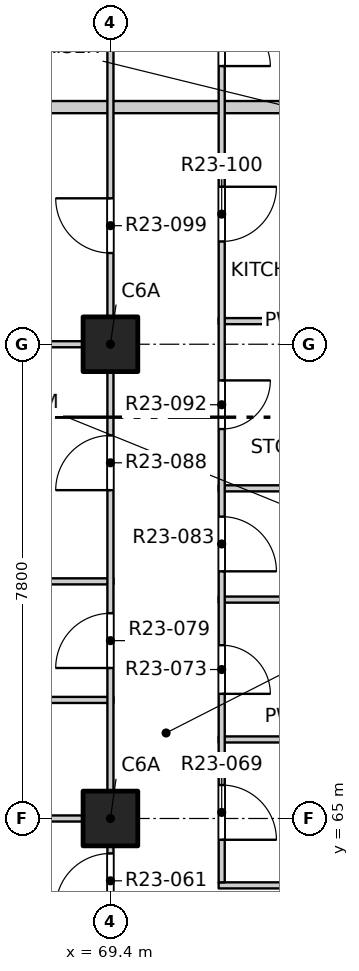
"""IFC4 building model, lengths in metres.
Left out: names, types, materials, properties, quantities, classifications, styles, units other than length and angle.
Written with IfcOpenShell. Run it as: python <this file> out.ifc"""

import sys

from ifc_helpers import new_model, si_unit, direction, frame, frame_2d, origin, origin_2d, place, context, subcontext, project, spatial, rectangle, extrude, element, fill, save


model = new_model("IFC4")
c1 = context("Model", 3, precision=1e-05, world=origin(), true_north=direction((0.0, 1.0)))
c2 = subcontext(c1, "Body", "Model", "MODEL_VIEW")
j1 = project(units=[si_unit("LENGTHUNIT", "METRE"), si_unit("PLANEANGLEUNIT", "RADIAN")], contexts=[c1])
p1 = place(None, origin())
s1 = spatial("IfcSite", under=j1, at=p1, CompositionType="ELEMENT")
p2 = place(p1, origin())
s2 = spatial("IfcBuilding", under=s1, at=p2, CompositionType="ELEMENT")
p3 = place(p2, frame((0.0, 0.0, 234.7)))
s3 = spatial("IfcBuildingStorey", under=s2, at=p3, CompositionType="ELEMENT", Elevation=234.7)
for number, where, z_axis, x_axis in (
    (1, (69.4, 65.0, -0.25), (0.0, 0.0, 1.0), (1.0, 0.0, 0.0)),
    (2, (69.4, 72.8, -0.25), (0.0, 0.0, 1.0), (1.0, 0.0, 0.0)),
):
    element("IfcColumn", number, at=place(p3, frame(where, z_axis=z_axis, x_axis=x_axis)), inside=s3, PredefinedType="COLUMN", context=c2, shape_type="SweptSolid", body=[
        extrude(rectangle(XDim=0.9, YDim=0.9, at=origin_2d()), origin(), (0.0, 0.0, 1.0), 3.4),
    ])
p4 = place(p3, frame((71.18, 63.9, 0.0), z_axis=(0.0, 0.0, 1.0), x_axis=(1.0, 0.0, 0.0)))
e3 = element("IfcWall", 3, at=p4, inside=s3, PredefinedType="PARTITIONING", context=c2, shape_type="SweptSolid", body=[
    extrude(rectangle(XDim=2.22, YDim=0.1, at=frame_2d((1.11, 0.0))), origin(), (0.0, 0.0, 1.0), 3.15),
])
p5 = place(p3, frame((61.9, 65.0, 0.0), z_axis=(0.0, 0.0, 1.0), x_axis=(1.0, 0.0, 0.0)))
e4 = element("IfcWall", 4, at=p5, inside=s3, PredefinedType="PARTITIONING", context=c2, shape_type="SweptSolid", body=[
    extrude(rectangle(XDim=7.55, YDim=0.1, at=frame_2d((3.775, 0.0))), origin(), (0.0, 0.0, 1.0), 3.15),
])
p6 = place(p3, frame((71.18, 66.3, 0.0), z_axis=(0.0, 0.0, 1.0), x_axis=(1.0, 0.0, 0.0)))
e5 = element("IfcWall", 5, at=p6, inside=s3, PredefinedType="PARTITIONING", context=c2, shape_type="SweptSolid", body=[
    extrude(rectangle(XDim=2.22, YDim=0.1, at=frame_2d((1.11, 0.0))), origin(), (0.0, 0.0, 1.0), 3.15),
])
p7 = place(p3, frame((65.75, 66.95, 0.0), z_axis=(0.0, 0.0, 1.0), x_axis=(1.0, 0.0, 0.0)))
e6 = element("IfcWall", 6, at=p7, inside=s3, PredefinedType="PARTITIONING", context=c2, shape_type="SweptSolid", body=[
    extrude(rectangle(XDim=3.7, YDim=0.1, at=frame_2d((1.85, 0.0))), origin(), (0.0, 0.0, 1.0), 3.15),
])
p8 = place(p3, frame((71.18, 68.6, 0.0), z_axis=(0.0, 0.0, 1.0), x_axis=(1.0, 0.0, 0.0)))
e7 = element("IfcWall", 7, at=p8, inside=s3, PredefinedType="PARTITIONING", context=c2, shape_type="SweptSolid", body=[
    extrude(rectangle(XDim=2.22, YDim=0.1, at=frame_2d((1.11, 0.0))), origin(), (0.0, 0.0, 1.0), 3.15),
])
p9 = place(p3, frame((61.9, 68.9, 0.0), z_axis=(0.0, 0.0, 1.0), x_axis=(1.0, 0.0, 0.0)))
e8 = element("IfcWall", 8, at=p9, inside=s3, PredefinedType="PARTITIONING", context=c2, shape_type="SweptSolid", body=[
    extrude(rectangle(XDim=7.55, YDim=0.1, at=frame_2d((3.775, 0.0))), origin(), (0.0, 0.0, 1.0), 2.55),
])
p10 = place(p3, frame((71.18, 70.43, 0.0), z_axis=(0.0, 0.0, 1.0), x_axis=(1.0, 0.0, 0.0)))
e9 = element("IfcWall", 9, at=p10, inside=s3, PredefinedType="PARTITIONING", context=c2, shape_type="SweptSolid", body=[
    extrude(rectangle(XDim=2.22, YDim=0.1, at=frame_2d((1.11, 0.0))), origin(), (0.0, 0.0, 1.0), 3.15),
])
p11 = place(p3, frame((61.9, 72.8, 0.0), z_axis=(0.0, 0.0, 1.0), x_axis=(1.0, 0.0, 0.0)))
e10 = element("IfcWall", 10, at=p11, inside=s3, PredefinedType="PARTITIONING", context=c2, shape_type="SweptSolid", body=[
    extrude(rectangle(XDim=7.55, YDim=0.1, at=frame_2d((3.775, 0.0))), origin(), (0.0, 0.0, 1.0), 3.15),
])
p12 = place(p3, frame((71.18, 73.18, 0.0), z_axis=(0.0, 0.0, 1.0), x_axis=(1.0, 0.0, 0.0)))
e11 = element("IfcWall", 11, at=p12, inside=s3, PredefinedType="PARTITIONING", context=c2, shape_type="SweptSolid", body=[
    extrude(rectangle(XDim=2.22, YDim=0.1, at=frame_2d((1.11, 0.0))), origin(), (0.0, 0.0, 1.0), 3.15),
])
p13 = place(p3, frame((61.9, 76.7, 0.0), z_axis=(0.0, 0.0, 1.0), x_axis=(1.0, 0.0, 0.0)))
e12 = element("IfcWall", 12, at=p13, inside=s3, PredefinedType="PARTITIONING", context=c2, shape_type="SweptSolid", body=[
    extrude(rectangle(XDim=11.5, YDim=0.2, at=frame_2d((5.75, 0.0))), origin(), (0.0, 0.0, 1.0), 2.55),
])
p14 = place(p3, frame((69.4, 41.9, 0.0), z_axis=(0.0, 0.0, 1.0), x_axis=(0.0, 1.0, 0.0)))
e13 = element("IfcWall", 13, at=p14, inside=s3, PredefinedType="PARTITIONING", context=c2, shape_type="SweptSolid", body=[
    extrude(rectangle(XDim=46.2, YDim=0.1, at=frame_2d((23.1, 0.0))), origin(), (0.0, 0.0, 1.0), 3.15),
])
p15 = place(p14, frame((1.2, 0.0, 0.0)))
e14 = element("IfcOpeningElement", 14, at=p15, cuts=e13, PredefinedType="OPENING", context=c2, shape_type="SweptSolid", body=[
    extrude(rectangle(XDim=0.9, YDim=2.1, at=frame_2d((0.45, 1.05))), frame((0.0, 0.06, 0.0), z_axis=(0.0, -1.0, 0.0), x_axis=(1.0, 0.0, 0.0)), (0.0, 0.0, 1.0), 0.12),
])
p16 = place(p14, frame((6.025, 0.0, 0.0)))
e15 = element("IfcOpeningElement", 15, at=p16, cuts=e13, PredefinedType="OPENING", context=c2, shape_type="SweptSolid", body=[
    extrude(rectangle(XDim=0.9, YDim=2.1, at=frame_2d((0.45, 1.05))), frame((0.0, 0.06, 0.0), z_axis=(0.0, -1.0, 0.0), x_axis=(1.0, 0.0, 0.0)), (0.0, 0.0, 1.0), 0.12),
])
p17 = place(p14, frame((9.975, 0.0, 0.0)))
e16 = element("IfcOpeningElement", 16, at=p17, cuts=e13, PredefinedType="OPENING", context=c2, shape_type="SweptSolid", body=[
    extrude(rectangle(XDim=0.9, YDim=2.1, at=frame_2d((0.45, 1.05))), frame((0.0, 0.06, 0.0), z_axis=(0.0, -1.0, 0.0), x_axis=(1.0, 0.0, 0.0)), (0.0, 0.0, 1.0), 0.12),
])
p18 = place(p14, frame((12.9, 0.0, 0.0)))
e17 = element("IfcOpeningElement", 17, at=p18, cuts=e13, PredefinedType="OPENING", context=c2, shape_type="SweptSolid", body=[
    extrude(rectangle(XDim=0.9, YDim=2.1, at=frame_2d((0.45, 1.05))), frame((0.0, 0.06, 0.0), z_axis=(0.0, -1.0, 0.0), x_axis=(1.0, 0.0, 0.0)), (0.0, 0.0, 1.0), 0.12),
])
p19 = place(p14, frame((17.775, 0.0, 0.0)))
e18 = element("IfcOpeningElement", 18, at=p19, cuts=e13, PredefinedType="OPENING", context=c2, shape_type="SweptSolid", body=[
    extrude(rectangle(XDim=0.9, YDim=2.1, at=frame_2d((0.45, 1.05))), frame((0.0, 0.06, 0.0), z_axis=(0.0, -1.0, 0.0), x_axis=(1.0, 0.0, 0.0)), (0.0, 0.0, 1.0), 0.12),
])
p20 = place(p14, frame((21.625, 0.0, 0.0)))
e19 = element("IfcOpeningElement", 19, at=p20, cuts=e13, PredefinedType="OPENING", context=c2, shape_type="SweptSolid", body=[
    extrude(rectangle(XDim=0.9, YDim=2.1, at=frame_2d((0.45, 1.05))), frame((0.0, 0.06, 0.0), z_axis=(0.0, -1.0, 0.0), x_axis=(1.0, 0.0, 0.0)), (0.0, 0.0, 1.0), 0.12),
])
p21 = place(p14, frame((25.575, 0.0, 0.0)))
e20 = element("IfcOpeningElement", 20, at=p21, cuts=e13, PredefinedType="OPENING", context=c2, shape_type="SweptSolid", body=[
    extrude(rectangle(XDim=0.9, YDim=2.1, at=frame_2d((0.45, 1.05))), frame((0.0, 0.06, 0.0), z_axis=(0.0, -1.0, 0.0), x_axis=(1.0, 0.0, 0.0)), (0.0, 0.0, 1.0), 0.12),
])
p22 = place(p14, frame((28.5, 0.0, 0.0)))
e21 = element("IfcOpeningElement", 21, at=p22, cuts=e13, PredefinedType="OPENING", context=c2, shape_type="SweptSolid", body=[
    extrude(rectangle(XDim=0.9, YDim=2.1, at=frame_2d((0.45, 1.05))), frame((0.0, 0.06, 0.0), z_axis=(0.0, -1.0, 0.0), x_axis=(1.0, 0.0, 0.0)), (0.0, 0.0, 1.0), 0.12),
])
p23 = place(p14, frame((32.4, 0.0, 0.0)))
e22 = element("IfcOpeningElement", 22, at=p23, cuts=e13, PredefinedType="OPENING", context=c2, shape_type="SweptSolid", body=[
    extrude(rectangle(XDim=0.9, YDim=2.1, at=frame_2d((0.45, 1.05))), frame((0.0, 0.06, 0.0), z_axis=(0.0, -1.0, 0.0), x_axis=(1.0, 0.0, 0.0)), (0.0, 0.0, 1.0), 0.12),
])
p24 = place(p14, frame((36.3, 0.0, 0.0)))
e23 = element("IfcOpeningElement", 23, at=p24, cuts=e13, PredefinedType="OPENING", context=c2, shape_type="SweptSolid", body=[
    extrude(rectangle(XDim=0.9, YDim=2.1, at=frame_2d((0.45, 1.05))), frame((0.0, 0.06, 0.0), z_axis=(0.0, -1.0, 0.0), x_axis=(1.0, 0.0, 0.0)), (0.0, 0.0, 1.0), 0.12),
])
p25 = place(p14, frame((40.2, 0.0, 0.0)))
e24 = element("IfcOpeningElement", 24, at=p25, cuts=e13, PredefinedType="OPENING", context=c2, shape_type="SweptSolid", body=[
    extrude(rectangle(XDim=0.9, YDim=2.1, at=frame_2d((0.45, 1.05))), frame((0.0, 0.06, 0.0), z_axis=(0.0, -1.0, 0.0), x_axis=(1.0, 0.0, 0.0)), (0.0, 0.0, 1.0), 0.12),
])
p26 = place(p14, frame((44.1, 0.0, 0.0)))
e25 = element("IfcOpeningElement", 25, at=p26, cuts=e13, PredefinedType="OPENING", context=c2, shape_type="SweptSolid", body=[
    extrude(rectangle(XDim=0.9, YDim=2.1, at=frame_2d((0.45, 1.05))), frame((0.0, 0.06, 0.0), z_axis=(0.0, -1.0, 0.0), x_axis=(1.0, 0.0, 0.0)), (0.0, 0.0, 1.0), 0.12),
])
p27 = place(p3, frame((71.23, 63.95, 0.0), z_axis=(0.0, 0.0, 1.0), x_axis=(0.0, 1.0, 0.0)))
e26 = element("IfcWall", 26, at=p27, inside=s3, PredefinedType="PARTITIONING", context=c2, shape_type="SweptSolid", body=[
    extrude(rectangle(XDim=17.85, YDim=0.1, at=frame_2d((8.925, 0.0))), origin(), (0.0, 0.0, 1.0), 3.15),
])
p28 = place(p27, frame((0.7, 0.0, 0.0)))
e27 = element("IfcOpeningElement", 27, at=p28, cuts=e26, PredefinedType="OPENING", context=c2, shape_type="SweptSolid", body=[
    extrude(rectangle(XDim=0.9, YDim=2.1, at=frame_2d((0.45, 1.05))), frame((0.0, 0.06, 0.0), z_axis=(0.0, -1.0, 0.0), x_axis=(1.0, 0.0, 0.0)), (0.0, 0.0, 1.0), 0.12),
])
p29 = place(p27, frame((3.1, 0.0, 0.0)))
e28 = element("IfcOpeningElement", 28, at=p29, cuts=e26, PredefinedType="OPENING", context=c2, shape_type="SweptSolid", body=[
    extrude(rectangle(XDim=0.8, YDim=2.1, at=frame_2d((0.4, 1.05))), frame((0.0, 0.06, 0.0), z_axis=(0.0, -1.0, 0.0), x_axis=(1.0, 0.0, 0.0)), (0.0, 0.0, 1.0), 0.12),
])
p30 = place(p27, frame((5.115, 0.0, 0.0)))
e29 = element("IfcOpeningElement", 29, at=p30, cuts=e26, PredefinedType="OPENING", context=c2, shape_type="SweptSolid", body=[
    extrude(rectangle(XDim=0.9, YDim=2.1, at=frame_2d((0.45, 1.05))), frame((0.0, 0.06, 0.0), z_axis=(0.0, -1.0, 0.0), x_axis=(1.0, 0.0, 0.0)), (0.0, 0.0, 1.0), 0.12),
])
p31 = place(p27, frame((7.455, 0.0, 0.0)))
e30 = element("IfcOpeningElement", 30, at=p31, cuts=e26, PredefinedType="OPENING", context=c2, shape_type="SweptSolid", body=[
    extrude(rectangle(XDim=0.8, YDim=2.1, at=frame_2d((0.4, 1.05))), frame((0.0, 0.06, 0.0), z_axis=(0.0, -1.0, 0.0), x_axis=(1.0, 0.0, 0.0)), (0.0, 0.0, 1.0), 0.12),
])
p32 = place(p27, frame((10.54, 0.0, 0.0)))
e31 = element("IfcOpeningElement", 31, at=p32, cuts=e26, PredefinedType="OPENING", context=c2, shape_type="SweptSolid", body=[
    extrude(rectangle(XDim=0.9, YDim=2.1, at=frame_2d((0.45, 1.05))), frame((0.0, 0.06, 0.0), z_axis=(0.0, -1.0, 0.0), x_axis=(1.0, 0.0, 0.0)), (0.0, 0.0, 1.0), 0.12),
])
p33 = place(p27, frame((13.425, 0.0, 0.0)))
e32 = element("IfcOpeningElement", 32, at=p33, cuts=e26, PredefinedType="OPENING", context=c2, shape_type="SweptSolid", body=[
    extrude(rectangle(XDim=0.8, YDim=2.1, at=frame_2d((0.4, 1.05))), frame((0.0, 0.06, 0.0), z_axis=(0.0, -1.0, 0.0), x_axis=(1.0, 0.0, 0.0)), (0.0, 0.0, 1.0), 0.12),
])
p34 = place(p27, frame((15.95, 0.0, 0.0)))
e33 = element("IfcOpeningElement", 33, at=p34, cuts=e26, PredefinedType="OPENING", context=c2, shape_type="SweptSolid", body=[
    extrude(rectangle(XDim=0.9, YDim=2.1, at=frame_2d((0.45, 1.05))), frame((0.0, 0.06, 0.0), z_axis=(0.0, -1.0, 0.0), x_axis=(1.0, 0.0, 0.0)), (0.0, 0.0, 1.0), 0.12),
])
p35 = place(p20, origin())
e34 = element("IfcDoor", 34, at=p35, inside=s3, OperationType="SINGLE_SWING_LEFT", PredefinedType="DOOR", context=c2, shape_type="SweptSolid", body=[
    extrude(rectangle(XDim=0.9, YDim=2.1, at=frame_2d((0.45, 1.05))), frame((0.0, 0.025, 0.0), z_axis=(0.0, -1.0, 0.0), x_axis=(1.0, 0.0, 0.0)), (0.0, 0.0, 1.0), 0.05),
])
fill(e19, e34)
p36 = place(p28, origin())
e35 = element("IfcDoor", 35, at=p36, inside=s3, OperationType="SINGLE_SWING_RIGHT", PredefinedType="DOOR", context=c2, shape_type="SweptSolid", body=[
    extrude(rectangle(XDim=0.9, YDim=2.1, at=frame_2d((0.45, 1.05))), frame((0.0, 0.025, 0.0), z_axis=(0.0, -1.0, 0.0), x_axis=(1.0, 0.0, 0.0)), (0.0, 0.0, 1.0), 0.05),
])
fill(e27, e35)
p37 = place(p29, origin())
e36 = element("IfcDoor", 36, at=p37, inside=s3, OperationType="SINGLE_SWING_RIGHT", PredefinedType="DOOR", context=c2, shape_type="SweptSolid", body=[
    extrude(rectangle(XDim=0.8, YDim=2.1, at=frame_2d((0.4, 1.05))), frame((0.0, 0.025, 0.0), z_axis=(0.0, -1.0, 0.0), x_axis=(1.0, 0.0, 0.0)), (0.0, 0.0, 1.0), 0.05),
])
fill(e28, e36)
p38 = place(p21, origin())
e37 = element("IfcDoor", 37, at=p38, inside=s3, OperationType="SINGLE_SWING_LEFT", PredefinedType="DOOR", context=c2, shape_type="SweptSolid", body=[
    extrude(rectangle(XDim=0.9, YDim=2.1, at=frame_2d((0.45, 1.05))), frame((0.0, 0.025, 0.0), z_axis=(0.0, -1.0, 0.0), x_axis=(1.0, 0.0, 0.0)), (0.0, 0.0, 1.0), 0.05),
])
fill(e20, e37)
p39 = place(p30, origin())
e38 = element("IfcDoor", 38, at=p39, inside=s3, OperationType="SINGLE_SWING_RIGHT", PredefinedType="DOOR", context=c2, shape_type="SweptSolid", body=[
    extrude(rectangle(XDim=0.9, YDim=2.1, at=frame_2d((0.45, 1.05))), frame((0.0, 0.025, 0.0), z_axis=(0.0, -1.0, 0.0), x_axis=(1.0, 0.0, 0.0)), (0.0, 0.0, 1.0), 0.05),
])
fill(e29, e38)
p40 = place(p22, origin())
e39 = element("IfcDoor", 39, at=p40, inside=s3, OperationType="SINGLE_SWING_LEFT", PredefinedType="DOOR", context=c2, shape_type="SweptSolid", body=[
    extrude(rectangle(XDim=0.9, YDim=2.1, at=frame_2d((0.45, 1.05))), frame((0.0, 0.025, 0.0), z_axis=(0.0, -1.0, 0.0), x_axis=(1.0, 0.0, 0.0)), (0.0, 0.0, 1.0), 0.05),
])
fill(e21, e39)
p41 = place(p31, origin())
e40 = element("IfcDoor", 40, at=p41, inside=s3, OperationType="SINGLE_SWING_LEFT", PredefinedType="DOOR", context=c2, shape_type="SweptSolid", body=[
    extrude(rectangle(XDim=0.8, YDim=2.1, at=frame_2d((0.4, 1.05))), frame((0.0, 0.025, 0.0), z_axis=(0.0, -1.0, 0.0), x_axis=(1.0, 0.0, 0.0)), (0.0, 0.0, 1.0), 0.05),
])
fill(e30, e40)
p42 = place(p23, origin())
e41 = element("IfcDoor", 41, at=p42, inside=s3, OperationType="SINGLE_SWING_RIGHT", PredefinedType="DOOR", context=c2, shape_type="SweptSolid", body=[
    extrude(rectangle(XDim=0.9, YDim=2.1, at=frame_2d((0.45, 1.05))), frame((0.0, 0.025, 0.0), z_axis=(0.0, -1.0, 0.0), x_axis=(1.0, 0.0, 0.0)), (0.0, 0.0, 1.0), 0.05),
])
fill(e22, e41)
p43 = place(p32, origin())
e42 = element("IfcDoor", 42, at=p43, inside=s3, OperationType="SINGLE_SWING_LEFT", PredefinedType="DOOR", context=c2, shape_type="SweptSolid", body=[
    extrude(rectangle(XDim=0.9, YDim=2.1, at=frame_2d((0.45, 1.05))), frame((0.0, 0.025, 0.0), z_axis=(0.0, -1.0, 0.0), x_axis=(1.0, 0.0, 0.0)), (0.0, 0.0, 1.0), 0.05),
])
fill(e31, e42)
p44 = place(p33, origin())
e43 = element("IfcDoor", 43, at=p44, inside=s3, OperationType="SINGLE_SWING_RIGHT", PredefinedType="DOOR", context=c2, shape_type="SweptSolid", body=[
    extrude(rectangle(XDim=0.8, YDim=2.1, at=frame_2d((0.4, 1.05))), frame((0.0, 0.025, 0.0), z_axis=(0.0, -1.0, 0.0), x_axis=(1.0, 0.0, 0.0)), (0.0, 0.0, 1.0), 0.05),
])
fill(e32, e43)
save(model, sys.argv[1])
